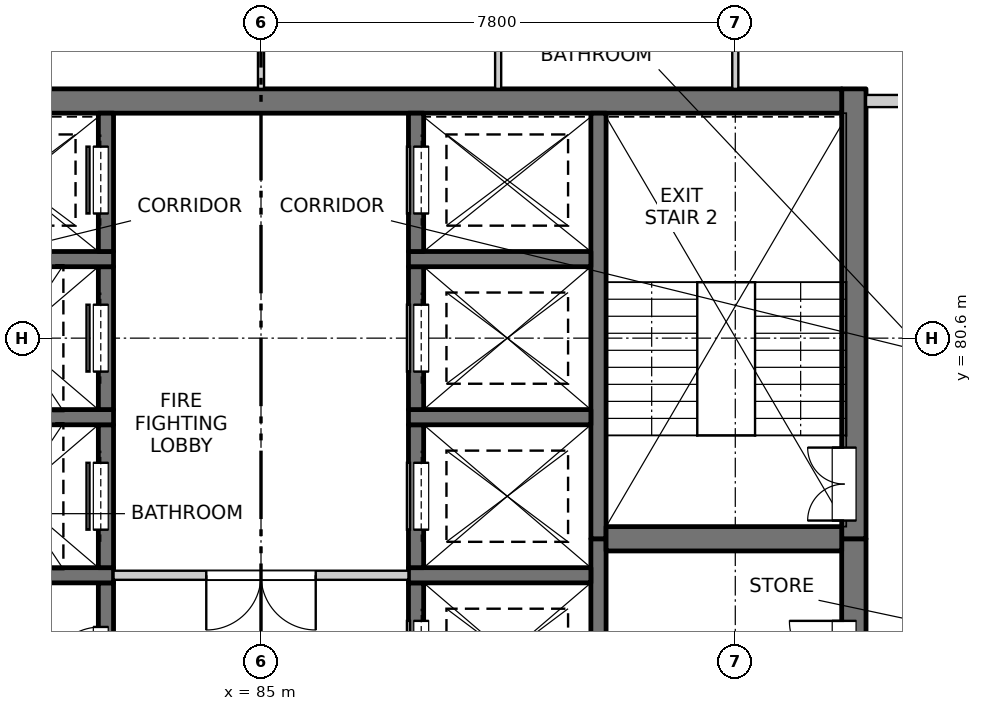
"""IFC4 building model, lengths in metres.
Left out: names, types, materials, properties, quantities, classifications, styles, units other than length and angle.
Written with IfcOpenShell. Run it as: python <this file> out.ifc"""

import sys

from ifc_helpers import new_model, si_unit, direction, frame, frame_2d, origin, place, context, subcontext, project, spatial, rectangle, extrude, element, fill, save


model = new_model("IFC4")
c1 = context("Model", 3, precision=1e-05, world=origin(), true_north=direction((0.0, 1.0)))
c2 = subcontext(c1, "Body", "Model", "MODEL_VIEW")
j1 = project(units=[si_unit("LENGTHUNIT", "METRE"), si_unit("PLANEANGLEUNIT", "RADIAN")], contexts=[c1])
p1 = place(None, origin())
s1 = spatial("IfcSite", under=j1, at=p1, CompositionType="ELEMENT")
p2 = place(p1, origin())
s2 = spatial("IfcBuilding", under=s1, at=p2, CompositionType="ELEMENT")
p3 = place(p2, frame((0.0, 0.0, 197.3)))
s3 = spatial("IfcBuildingStorey", under=s2, at=p3, CompositionType="ELEMENT", Elevation=197.3)
p4 = place(p3, frame((94.75, 61.95, -0.3), z_axis=(0.0, 0.0, 1.0), x_axis=(0.0, 1.0, 0.0)))
e1 = element("IfcWall", 1, at=p4, inside=s3, PredefinedType="SOLIDWALL", context=c2, shape_type="SweptSolid", body=[
    extrude(rectangle(XDim=15.35, YDim=0.4, at=frame_2d((7.675, 0.0))), origin(), (0.0, 0.0, 1.0), 3.45),
])
p5 = place(p4, frame((0.925, 0.0, 0.3)))
e2 = element("IfcOpeningElement", 2, at=p5, cuts=e1, PredefinedType="OPENING", context=c2, shape_type="SweptSolid", body=[
    extrude(rectangle(XDim=0.9, YDim=2.1, at=frame_2d((0.45, 1.05))), frame((0.0, 0.21, 0.0), z_axis=(0.0, -1.0, 0.0), x_axis=(1.0, 0.0, 0.0)), (0.0, 0.0, 1.0), 0.42),
])
p6 = place(p4, frame((3.8, 0.0, 0.3)))
e3 = element("IfcOpeningElement", 3, at=p6, cuts=e1, PredefinedType="OPENING", context=c2, shape_type="SweptSolid", body=[
    extrude(rectangle(XDim=0.9, YDim=2.1, at=frame_2d((0.45, 1.05))), frame((0.0, 0.21, 0.0), z_axis=(0.0, -1.0, 0.0), x_axis=(1.0, 0.0, 0.0)), (0.0, 0.0, 1.0), 0.42),
])
p7 = place(p4, frame((6.8, 0.0, 0.3)))
e4 = element("IfcOpeningElement", 4, at=p7, cuts=e1, PredefinedType="OPENING", context=c2, shape_type="SweptSolid", body=[
    extrude(rectangle(XDim=0.9, YDim=2.1, at=frame_2d((0.45, 1.05))), frame((0.0, 0.21, 0.0), z_axis=(0.0, -1.0, 0.0), x_axis=(1.0, 0.0, 0.0)), (0.0, 0.0, 1.0), 0.42),
])
p8 = place(p4, frame((9.8, 0.0, 0.3)))
e5 = element("IfcOpeningElement", 5, at=p8, cuts=e1, PredefinedType="OPENING", context=c2, shape_type="SweptSolid", body=[
    extrude(rectangle(XDim=0.9, YDim=2.1, at=frame_2d((0.45, 1.05))), frame((0.0, 0.21, 0.0), z_axis=(0.0, -1.0, 0.0), x_axis=(1.0, 0.0, 0.0)), (0.0, 0.0, 1.0), 0.42),
])
p9 = place(p4, frame((13.1, 0.0, 0.3)))
e6 = element("IfcOpeningElement", 6, at=p9, cuts=e1, PredefinedType="OPENING", context=c2, shape_type="SweptSolid", body=[
    extrude(rectangle(XDim=0.9, YDim=2.1, at=frame_2d((0.45, 1.05))), frame((0.0, 0.21, 0.0), z_axis=(0.0, -1.0, 0.0), x_axis=(1.0, 0.0, 0.0)), (0.0, 0.0, 1.0), 0.42),
])
p10 = place(p3, frame((94.75, 77.3, -0.3), z_axis=(0.0, 0.0, 1.0), x_axis=(0.0, 1.0, 0.0)))
e7 = element("IfcWall", 7, at=p10, inside=s3, PredefinedType="SOLIDWALL", context=c2, shape_type="SweptSolid", body=[
    extrude(rectangle(XDim=7.4, YDim=0.4, at=frame_2d((3.7, 0.0))), origin(), (0.0, 0.0, 1.0), 3.45),
])
p11 = place(p10, frame((0.3, 0.0, 0.3)))
e8 = element("IfcOpeningElement", 8, at=p11, cuts=e7, PredefinedType="OPENING", context=c2, shape_type="SweptSolid", body=[
    extrude(rectangle(XDim=1.2, YDim=2.1, at=frame_2d((0.6, 1.05))), frame((0.0, 0.21, 0.0), z_axis=(0.0, -1.0, 0.0), x_axis=(1.0, 0.0, 0.0)), (0.0, 0.0, 1.0), 0.42),
])
p12 = place(p3, frame((75.45, 84.5, -0.3), z_axis=(0.0, 0.0, 1.0), x_axis=(1.0, 0.0, 0.0)))
e9 = element("IfcWall", 9, at=p12, inside=s3, PredefinedType="SOLIDWALL", context=c2, shape_type="SweptSolid", body=[
    extrude(rectangle(XDim=19.1, YDim=0.4, at=frame_2d((9.55, 0.0))), origin(), (0.0, 0.0, 1.0), 3.45),
])
p13 = place(p3, frame((90.55, 61.95, -0.3), z_axis=(0.0, 0.0, 1.0), x_axis=(0.0, 1.0, 0.0)))
e10 = element("IfcWall", 10, at=p13, inside=s3, PredefinedType="SOLIDWALL", context=c2, shape_type="SweptSolid", body=[
    extrude(rectangle(XDim=15.35, YDim=0.25, at=frame_2d((7.675, 0.0))), origin(), (0.0, 0.0, 1.0), 3.45),
])
p14 = place(p3, frame((90.55, 77.3, -0.3), z_axis=(0.0, 0.0, 1.0), x_axis=(0.0, 1.0, 0.0)))
e11 = element("IfcWall", 11, at=p14, inside=s3, PredefinedType="SOLIDWALL", context=c2, shape_type="SweptSolid", body=[
    extrude(rectangle(XDim=7.0, YDim=0.25, at=frame_2d((3.5, 0.0))), origin(), (0.0, 0.0, 1.0), 3.45),
])
p15 = place(p3, frame((82.45, 74.225, -0.3), z_axis=(0.0, 0.0, 1.0), x_axis=(0.0, 1.0, 0.0)))
e12 = element("IfcWall", 12, at=p15, inside=s3, PredefinedType="SOLIDWALL", context=c2, shape_type="SweptSolid", body=[
    extrude(rectangle(XDim=2.35, YDim=0.25, at=frame_2d((1.175, 0.0))), origin(), (0.0, 0.0, 1.0), 3.45),
])
p16 = place(p15, frame((0.725, 0.0, 0.3)))
e13 = element("IfcOpeningElement", 13, at=p16, cuts=e12, PredefinedType="OPENING", context=c2, shape_type="SweptSolid", body=[
    extrude(rectangle(XDim=0.9, YDim=2.1, at=frame_2d((0.45, 1.05))), frame((0.0, 0.135, 0.0), z_axis=(0.0, -1.0, 0.0), x_axis=(1.0, 0.0, 0.0)), (0.0, 0.0, 1.0), 0.27),
])
p17 = place(p3, frame((79.575, 76.7, -0.3), z_axis=(0.0, 0.0, 1.0), x_axis=(1.0, 0.0, 0.0)))
e14 = element("IfcWall", 14, at=p17, inside=s3, PredefinedType="SOLIDWALL", context=c2, shape_type="SweptSolid", body=[
    extrude(rectangle(XDim=3.0, YDim=0.25, at=frame_2d((1.5, 0.0))), origin(), (0.0, 0.0, 1.0), 3.45),
])
p18 = place(p3, frame((82.45, 76.825, -0.3), z_axis=(0.0, 0.0, 1.0), x_axis=(0.0, 1.0, 0.0)))
e15 = element("IfcWall", 15, at=p18, inside=s3, PredefinedType="SOLIDWALL", context=c2, shape_type="SweptSolid", body=[
    extrude(rectangle(XDim=2.35, YDim=0.25, at=frame_2d((1.175, 0.0))), origin(), (0.0, 0.0, 1.0), 3.45),
])
p19 = place(p18, frame((0.625, 0.0, 0.3)))
e16 = element("IfcOpeningElement", 16, at=p19, cuts=e15, PredefinedType="OPENING", context=c2, shape_type="SweptSolid", body=[
    extrude(rectangle(XDim=1.1, YDim=2.1, at=frame_2d((0.55, 1.05))), frame((0.0, 0.135, 0.0), z_axis=(0.0, -1.0, 0.0), x_axis=(1.0, 0.0, 0.0)), (0.0, 0.0, 1.0), 0.27),
])
p20 = place(p3, frame((79.575, 79.3, -0.3), z_axis=(0.0, 0.0, 1.0), x_axis=(1.0, 0.0, 0.0)))
e17 = element("IfcWall", 17, at=p20, inside=s3, PredefinedType="SOLIDWALL", context=c2, shape_type="SweptSolid", body=[
    extrude(rectangle(XDim=3.0, YDim=0.25, at=frame_2d((1.5, 0.0))), origin(), (0.0, 0.0, 1.0), 3.45),
])
p21 = place(p3, frame((82.45, 79.425, -0.3), z_axis=(0.0, 0.0, 1.0), x_axis=(0.0, 1.0, 0.0)))
e18 = element("IfcWall", 18, at=p21, inside=s3, PredefinedType="SOLIDWALL", context=c2, shape_type="SweptSolid", body=[
    extrude(rectangle(XDim=2.35, YDim=0.25, at=frame_2d((1.175, 0.0))), origin(), (0.0, 0.0, 1.0), 3.45),
])
p22 = place(p21, frame((0.625, 0.0, 0.3)))
e19 = element("IfcOpeningElement", 19, at=p22, cuts=e18, PredefinedType="OPENING", context=c2, shape_type="SweptSolid", body=[
    extrude(rectangle(XDim=1.1, YDim=2.1, at=frame_2d((0.55, 1.05))), frame((0.0, 0.135, 0.0), z_axis=(0.0, -1.0, 0.0), x_axis=(1.0, 0.0, 0.0)), (0.0, 0.0, 1.0), 0.27),
])
p23 = place(p3, frame((79.575, 81.9, -0.3), z_axis=(0.0, 0.0, 1.0), x_axis=(1.0, 0.0, 0.0)))
e20 = element("IfcWall", 20, at=p23, inside=s3, PredefinedType="SOLIDWALL", context=c2, shape_type="SweptSolid", body=[
    extrude(rectangle(XDim=3.0, YDim=0.25, at=frame_2d((1.5, 0.0))), origin(), (0.0, 0.0, 1.0), 3.45),
])
p24 = place(p3, frame((82.45, 82.025, -0.3), z_axis=(0.0, 0.0, 1.0), x_axis=(0.0, 1.0, 0.0)))
e21 = element("IfcWall", 21, at=p24, inside=s3, PredefinedType="SOLIDWALL", context=c2, shape_type="SweptSolid", body=[
    extrude(rectangle(XDim=2.275, YDim=0.25, at=frame_2d((1.138, 0.0))), origin(), (0.0, 0.0, 1.0), 3.45),
])
p25 = place(p24, frame((0.625, 0.0, 0.3)))
e22 = element("IfcOpeningElement", 22, at=p25, cuts=e21, PredefinedType="OPENING", context=c2, shape_type="SweptSolid", body=[
    extrude(rectangle(XDim=1.1, YDim=2.1, at=frame_2d((0.55, 1.05))), frame((0.0, 0.135, 0.0), z_axis=(0.0, -1.0, 0.0), x_axis=(1.0, 0.0, 0.0)), (0.0, 0.0, 1.0), 0.27),
])
p26 = place(p3, frame((87.55, 74.225, -0.3), z_axis=(0.0, 0.0, 1.0), x_axis=(0.0, 1.0, 0.0)))
e23 = element("IfcWall", 23, at=p26, inside=s3, PredefinedType="SOLIDWALL", context=c2, shape_type="SweptSolid", body=[
    extrude(rectangle(XDim=2.35, YDim=0.25, at=frame_2d((1.175, 0.0))), origin(), (0.0, 0.0, 1.0), 3.45),
])
p27 = place(p26, frame((0.625, 0.0, 0.3)))
e24 = element("IfcOpeningElement", 24, at=p27, cuts=e23, PredefinedType="OPENING", context=c2, shape_type="SweptSolid", body=[
    extrude(rectangle(XDim=1.1, YDim=2.1, at=frame_2d((0.55, 1.05))), frame((0.0, 0.135, 0.0), z_axis=(0.0, -1.0, 0.0), x_axis=(1.0, 0.0, 0.0)), (0.0, 0.0, 1.0), 0.27),
])
p28 = place(p3, frame((87.425, 76.7, -0.3), z_axis=(0.0, 0.0, 1.0), x_axis=(1.0, 0.0, 0.0)))
e25 = element("IfcWall", 25, at=p28, inside=s3, PredefinedType="SOLIDWALL", context=c2, shape_type="SweptSolid", body=[
    extrude(rectangle(XDim=3.0, YDim=0.25, at=frame_2d((1.5, 0.0))), origin(), (0.0, 0.0, 1.0), 3.45),
])
p29 = place(p3, frame((87.55, 76.825, -0.3), z_axis=(0.0, 0.0, 1.0), x_axis=(0.0, 1.0, 0.0)))
e26 = element("IfcWall", 26, at=p29, inside=s3, PredefinedType="SOLIDWALL", context=c2, shape_type="SweptSolid", body=[
    extrude(rectangle(XDim=2.35, YDim=0.25, at=frame_2d((1.175, 0.0))), origin(), (0.0, 0.0, 1.0), 3.45),
])
p30 = place(p29, frame((0.625, 0.0, 0.3)))
e27 = element("IfcOpeningElement", 27, at=p30, cuts=e26, PredefinedType="OPENING", context=c2, shape_type="SweptSolid", body=[
    extrude(rectangle(XDim=1.1, YDim=2.1, at=frame_2d((0.55, 1.05))), frame((0.0, 0.135, 0.0), z_axis=(0.0, -1.0, 0.0), x_axis=(1.0, 0.0, 0.0)), (0.0, 0.0, 1.0), 0.27),
])
p31 = place(p3, frame((87.425, 79.3, -0.3), z_axis=(0.0, 0.0, 1.0), x_axis=(1.0, 0.0, 0.0)))
e28 = element("IfcWall", 28, at=p31, inside=s3, PredefinedType="SOLIDWALL", context=c2, shape_type="SweptSolid", body=[
    extrude(rectangle(XDim=3.0, YDim=0.25, at=frame_2d((1.5, 0.0))), origin(), (0.0, 0.0, 1.0), 3.45),
])
p32 = place(p3, frame((87.55, 79.425, -0.3), z_axis=(0.0, 0.0, 1.0), x_axis=(0.0, 1.0, 0.0)))
e29 = element("IfcWall", 29, at=p32, inside=s3, PredefinedType="SOLIDWALL", context=c2, shape_type="SweptSolid", body=[
    extrude(rectangle(XDim=2.35, YDim=0.25, at=frame_2d((1.175, 0.0))), origin(), (0.0, 0.0, 1.0), 3.45),
])
p33 = place(p32, frame((0.625, 0.0, 0.3)))
e30 = element("IfcOpeningElement", 30, at=p33, cuts=e29, PredefinedType="OPENING", context=c2, shape_type="SweptSolid", body=[
    extrude(rectangle(XDim=1.1, YDim=2.1, at=frame_2d((0.55, 1.05))), frame((0.0, 0.135, 0.0), z_axis=(0.0, -1.0, 0.0), x_axis=(1.0, 0.0, 0.0)), (0.0, 0.0, 1.0), 0.27),
])
p34 = place(p3, frame((87.425, 81.9, -0.3), z_axis=(0.0, 0.0, 1.0), x_axis=(1.0, 0.0, 0.0)))
e31 = element("IfcWall", 31, at=p34, inside=s3, PredefinedType="SOLIDWALL", context=c2, shape_type="SweptSolid", body=[
    extrude(rectangle(XDim=3.0, YDim=0.25, at=frame_2d((1.5, 0.0))), origin(), (0.0, 0.0, 1.0), 3.45),
])
p35 = place(p3, frame((87.55, 82.025, -0.3), z_axis=(0.0, 0.0, 1.0), x_axis=(0.0, 1.0, 0.0)))
e32 = element("IfcWall", 32, at=p35, inside=s3, PredefinedType="SOLIDWALL", context=c2, shape_type="SweptSolid", body=[
    extrude(rectangle(XDim=2.275, YDim=0.25, at=frame_2d((1.138, 0.0))), origin(), (0.0, 0.0, 1.0), 3.45),
])
p36 = place(p35, frame((0.625, 0.0, 0.3)))
e33 = element("IfcOpeningElement", 33, at=p36, cuts=e32, PredefinedType="OPENING", context=c2, shape_type="SweptSolid", body=[
    extrude(rectangle(XDim=1.1, YDim=2.1, at=frame_2d((0.55, 1.05))), frame((0.0, 0.135, 0.0), z_axis=(0.0, -1.0, 0.0), x_axis=(1.0, 0.0, 0.0)), (0.0, 0.0, 1.0), 0.27),
])
p37 = place(p3, frame((90.675, 77.3, -0.3), z_axis=(0.0, 0.0, 1.0), x_axis=(1.0, 0.0, 0.0)))
e34 = element("IfcWall", 34, at=p37, inside=s3, PredefinedType="SOLIDWALL", context=c2, shape_type="SweptSolid", body=[
    extrude(rectangle(XDim=3.875, YDim=0.4, at=frame_2d((1.938, 0.0))), origin(), (0.0, 0.0, 1.0), 3.45),
])
p38 = place(p3, frame((82.575, 76.7, 0.0), z_axis=(0.0, 0.0, 1.0), x_axis=(1.0, 0.0, 0.0)))
e35 = element("IfcWall", 35, at=p38, inside=s3, PredefinedType="PARTITIONING", context=c2, shape_type="SweptSolid", body=[
    extrude(rectangle(XDim=4.85, YDim=0.15, at=frame_2d((2.425, 0.0))), origin(), (0.0, 0.0, 1.0), 3.15),
])
p39 = place(p38, frame((1.525, 0.0, 0.0)))
e36 = element("IfcOpeningElement", 36, at=p39, cuts=e35, PredefinedType="OPENING", context=c2, shape_type="SweptSolid", body=[
    extrude(rectangle(XDim=1.8, YDim=2.1, at=frame_2d((0.9, 1.05))), frame((0.0, 0.085, 0.0), z_axis=(0.0, -1.0, 0.0), x_axis=(1.0, 0.0, 0.0)), (0.0, 0.0, 1.0), 0.17),
])
p40 = place(p3, frame((94.95, 84.5, 0.0), z_axis=(0.0, 0.0, 1.0), x_axis=(1.0, 0.0, 0.0)))
e37 = element("IfcWall", 37, at=p40, inside=s3, PredefinedType="PARTITIONING", context=c2, shape_type="SweptSolid", body=[
    extrude(rectangle(XDim=1.85, YDim=0.2, at=frame_2d((0.925, 0.0))), origin(), (0.0, 0.0, 1.0), 3.15),
])
p41 = place(p3, frame((85.0, 84.7, 0.0), z_axis=(0.0, 0.0, 1.0), x_axis=(0.0, 1.0, 0.0)))
e38 = element("IfcWall", 38, at=p41, inside=s3, PredefinedType="PARTITIONING", context=c2, shape_type="SweptSolid", body=[
    extrude(rectangle(XDim=3.4, YDim=0.1, at=frame_2d((1.7, 0.0))), origin(), (0.0, 0.0, 1.0), 3.15),
])
p42 = place(p41, frame((1.3, 0.0, 0.0)))
e39 = element("IfcOpeningElement", 39, at=p42, cuts=e38, PredefinedType="OPENING", context=c2, shape_type="SweptSolid", body=[
    extrude(rectangle(XDim=0.9, YDim=2.1, at=frame_2d((0.45, 1.05))), frame((0.0, 0.06, 0.0), z_axis=(0.0, -1.0, 0.0), x_axis=(1.0, 0.0, 0.0)), (0.0, 0.0, 1.0), 0.12),
])
p43 = place(p3, frame((88.9, 84.7, 0.0), z_axis=(0.0, 0.0, 1.0), x_axis=(0.0, 1.0, 0.0)))
e40 = element("IfcWall", 40, at=p43, inside=s3, PredefinedType="PARTITIONING", context=c2, shape_type="SweptSolid", body=[
    extrude(rectangle(XDim=3.4, YDim=0.1, at=frame_2d((1.7, 0.0))), origin(), (0.0, 0.0, 1.0), 3.15),
])
p44 = place(p43, frame((1.3, 0.0, 0.0)))
e41 = element("IfcOpeningElement", 41, at=p44, cuts=e40, PredefinedType="OPENING", context=c2, shape_type="SweptSolid", body=[
    extrude(rectangle(XDim=0.9, YDim=2.1, at=frame_2d((0.45, 1.05))), frame((0.0, 0.06, 0.0), z_axis=(0.0, -1.0, 0.0), x_axis=(1.0, 0.0, 0.0)), (0.0, 0.0, 1.0), 0.12),
])
p45 = place(p3, frame((92.8, 84.7, 0.0), z_axis=(0.0, 0.0, 1.0), x_axis=(0.0, 1.0, 0.0)))
e42 = element("IfcWall", 42, at=p45, inside=s3, PredefinedType="PARTITIONING", context=c2, shape_type="SweptSolid", body=[
    extrude(rectangle(XDim=3.4, YDim=0.1, at=frame_2d((1.7, 0.0))), origin(), (0.0, 0.0, 1.0), 3.15),
])
p46 = place(p45, frame((1.3, 0.0, 0.0)))
e43 = element("IfcOpeningElement", 43, at=p46, cuts=e42, PredefinedType="OPENING", context=c2, shape_type="SweptSolid", body=[
    extrude(rectangle(XDim=0.9, YDim=2.1, at=frame_2d((0.45, 1.05))), frame((0.0, 0.06, 0.0), z_axis=(0.0, -1.0, 0.0), x_axis=(1.0, 0.0, 0.0)), (0.0, 0.0, 1.0), 0.12),
])
p47 = place(p16, origin())
e44 = element("IfcDoor", 44, at=p47, inside=s3, OperationType="SINGLE_SWING_LEFT", PredefinedType="DOOR", context=c2, shape_type="SweptSolid", body=[
    extrude(rectangle(XDim=0.9, YDim=2.1, at=frame_2d((0.45, 1.05))), frame((0.0, 0.11, 0.0), z_axis=(0.0, -1.0, 0.0), x_axis=(1.0, 0.0, 0.0)), (0.0, 0.0, 1.0), 0.05),
])
fill(e13, e44)
p48 = place(p27, origin())
e45 = element("IfcDoor", 45, at=p48, inside=s3, OperationType="SLIDING_TO_LEFT", PredefinedType="DOOR", context=c2, shape_type="SweptSolid", body=[
    extrude(rectangle(XDim=1.1, YDim=2.1, at=frame_2d((0.55, 1.05))), frame((0.0, -0.06, 0.0), z_axis=(0.0, -1.0, 0.0), x_axis=(1.0, 0.0, 0.0)), (0.0, 0.0, 1.0), 0.05),
])
fill(e24, e45)
p49 = place(p9, origin())
e46 = element("IfcDoor", 46, at=p49, inside=s3, OperationType="SINGLE_SWING_RIGHT", PredefinedType="DOOR", context=c2, shape_type="SweptSolid", body=[
    extrude(rectangle(XDim=0.9, YDim=2.1, at=frame_2d((0.45, 1.05))), frame((0.0, 0.185, 0.0), z_axis=(0.0, -1.0, 0.0), x_axis=(1.0, 0.0, 0.0)), (0.0, 0.0, 1.0), 0.05),
])
fill(e6, e46)
p50 = place(p39, origin())
e47 = element("IfcDoor", 47, at=p50, inside=s3, OperationType="DOUBLE_DOOR_SINGLE_SWING", PredefinedType="DOOR", context=c2, shape_type="SweptSolid", body=[
    extrude(rectangle(XDim=1.8, YDim=2.1, at=frame_2d((0.9, 1.05))), frame((0.0, 0.025, 0.0), z_axis=(0.0, -1.0, 0.0), x_axis=(1.0, 0.0, 0.0)), (0.0, 0.0, 1.0), 0.05),
])
fill(e36, e47)
p51 = place(p19, origin())
e48 = element("IfcDoor", 48, at=p51, inside=s3, OperationType="SLIDING_TO_LEFT", PredefinedType="DOOR", context=c2, shape_type="SweptSolid", body=[
    extrude(rectangle(XDim=1.1, YDim=2.1, at=frame_2d((0.55, 1.05))), frame((0.0, 0.11, 0.0), z_axis=(0.0, -1.0, 0.0), x_axis=(1.0, 0.0, 0.0)), (0.0, 0.0, 1.0), 0.05),
])
fill(e16, e48)
p52 = place(p30, origin())
e49 = element("IfcDoor", 49, at=p52, inside=s3, OperationType="SLIDING_TO_LEFT", PredefinedType="DOOR", context=c2, shape_type="SweptSolid", body=[
    extrude(rectangle(XDim=1.1, YDim=2.1, at=frame_2d((0.55, 1.05))), frame((0.0, -0.06, 0.0), z_axis=(0.0, -1.0, 0.0), x_axis=(1.0, 0.0, 0.0)), (0.0, 0.0, 1.0), 0.05),
])
fill(e27, e49)
p53 = place(p11, origin())
e50 = element("IfcDoor", 50, at=p53, inside=s3, OperationType="DOUBLE_DOOR_SINGLE_SWING", PredefinedType="DOOR", context=c2, shape_type="SweptSolid", body=[
    extrude(rectangle(XDim=1.2, YDim=2.1, at=frame_2d((0.6, 1.05))), frame((0.0, 0.185, 0.0), z_axis=(0.0, -1.0, 0.0), x_axis=(1.0, 0.0, 0.0)), (0.0, 0.0, 1.0), 0.05),
])
fill(e8, e50)
p54 = place(p22, origin())
e51 = element("IfcDoor", 51, at=p54, inside=s3, OperationType="SLIDING_TO_LEFT", PredefinedType="DOOR", context=c2, shape_type="SweptSolid", body=[
    extrude(rectangle(XDim=1.1, YDim=2.1, at=frame_2d((0.55, 1.05))), frame((0.0, 0.11, 0.0), z_axis=(0.0, -1.0, 0.0), x_axis=(1.0, 0.0, 0.0)), (0.0, 0.0, 1.0), 0.05),
])
fill(e19, e51)
p55 = place(p33, origin())
e52 = element("IfcDoor", 52, at=p55, inside=s3, OperationType="SLIDING_TO_RIGHT", PredefinedType="DOOR", context=c2, shape_type="SweptSolid", body=[
    extrude(rectangle(XDim=1.1, YDim=2.1, at=frame_2d((0.55, 1.05))), frame((0.0, -0.06, 0.0), z_axis=(0.0, -1.0, 0.0), x_axis=(1.0, 0.0, 0.0)), (0.0, 0.0, 1.0), 0.05),
])
fill(e30, e52)
p56 = place(p25, origin())
e53 = element("IfcDoor", 53, at=p56, inside=s3, OperationType="SLIDING_TO_RIGHT", PredefinedType="DOOR", context=c2, shape_type="SweptSolid", body=[
    extrude(rectangle(XDim=1.1, YDim=2.1, at=frame_2d((0.55, 1.05))), frame((0.0, 0.11, 0.0), z_axis=(0.0, -1.0, 0.0), x_axis=(1.0, 0.0, 0.0)), (0.0, 0.0, 1.0), 0.05),
])
fill(e22, e53)
p57 = place(p36, origin())
e54 = element("IfcDoor", 54, at=p57, inside=s3, OperationType="SLIDING_TO_RIGHT", PredefinedType="DOOR", context=c2, shape_type="SweptSolid", body=[
    extrude(rectangle(XDim=1.1, YDim=2.1, at=frame_2d((0.55, 1.05))), frame((0.0, -0.06, 0.0), z_axis=(0.0, -1.0, 0.0), x_axis=(1.0, 0.0, 0.0)), (0.0, 0.0, 1.0), 0.05),
])
fill(e33, e54)
save(model, sys.argv[1])
